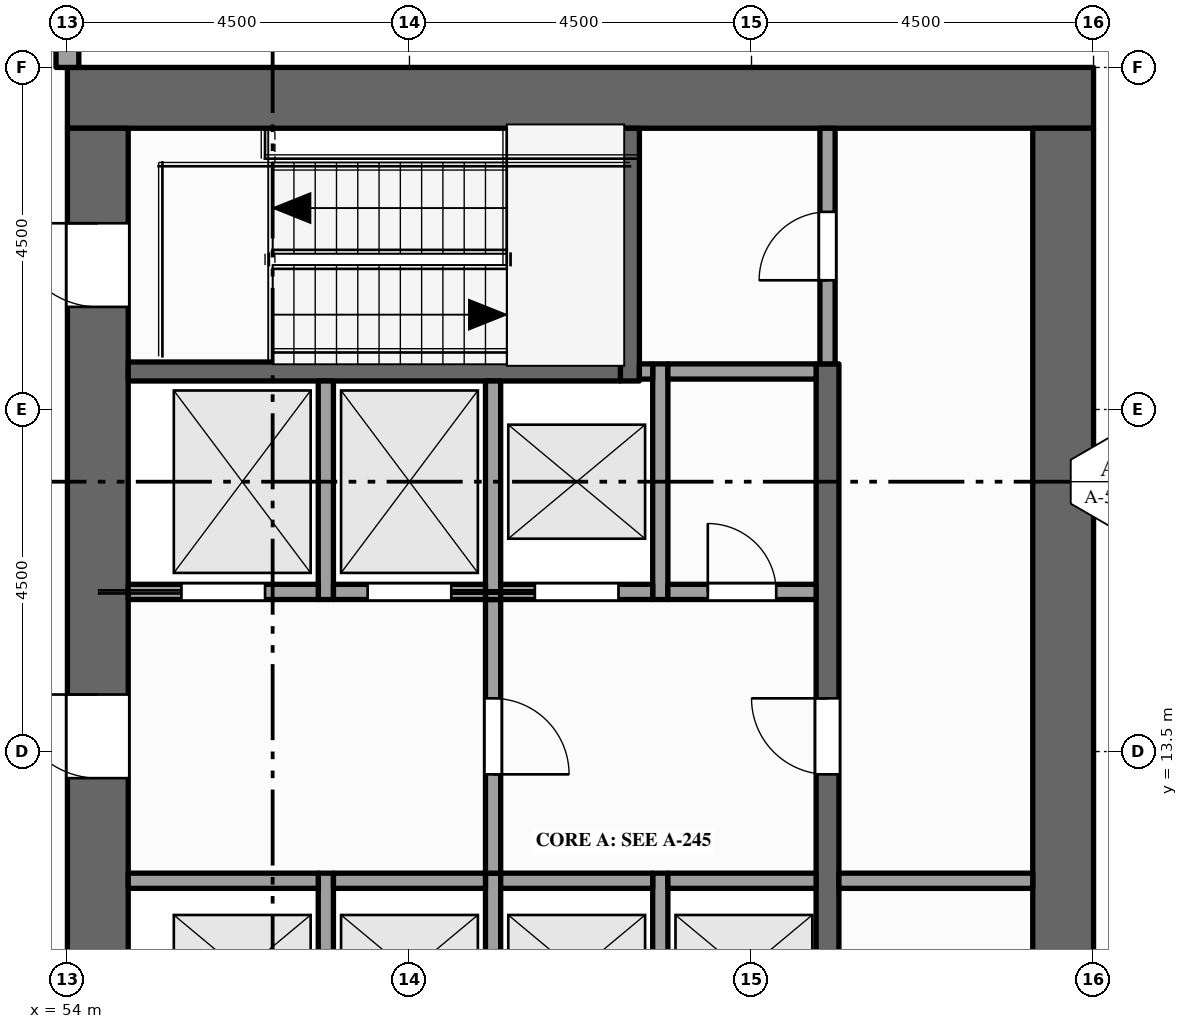
"""IFC4 building model, lengths in metres.
Left out: names, types, materials, properties, quantities, classifications, styles, units other than length and angle.
Written with IfcOpenShell. Run it as: python <this file> out.ifc"""

import sys

from ifc_helpers import new_model, si_unit, direction, frame, frame_2d, origin, place, context, subcontext, project, spatial, rectangle, extrude, element, fill, save


model = new_model("IFC4")
c1 = context("Model", 3, precision=1e-05, world=origin(), true_north=direction((0.0, 1.0)))
c2 = subcontext(c1, "Body", "Model", "MODEL_VIEW")
j1 = project(units=[si_unit("LENGTHUNIT", "METRE"), si_unit("PLANEANGLEUNIT", "RADIAN")], contexts=[c1])
p1 = place(None, origin())
s1 = spatial("IfcSite", under=j1, at=p1, CompositionType="ELEMENT")
p2 = place(p1, origin())
s2 = spatial("IfcBuilding", under=s1, at=p2, CompositionType="ELEMENT")
p3 = place(p2, frame((0.0, 0.0, 249.0)))
s3 = spatial("IfcBuildingStorey", under=s2, at=p3, CompositionType="ELEMENT", Elevation=249.0)
p4 = place(p3, frame((54.0, 22.1, -0.15), z_axis=(0.0, 0.0, 1.0), x_axis=(1.0, 0.0, 0.0)))
e1 = element("IfcWall", 1, at=p4, inside=s3, PredefinedType="SHEAR", context=c2, shape_type="SweptSolid", body=[
    extrude(rectangle(XDim=13.5, YDim=0.8, at=frame_2d((6.75, 0.0))), origin(), (0.0, 0.0, 1.0), 4.0),
])
p5 = place(p3, frame((54.4, 0.8, -0.15), z_axis=(0.0, 0.0, 1.0), x_axis=(0.0, 1.0, 0.0)))
e2 = element("IfcWall", 2, at=p5, inside=s3, PredefinedType="SHEAR", context=c2, shape_type="SweptSolid", body=[
    extrude(rectangle(XDim=20.9, YDim=0.8, at=frame_2d((10.45, 0.0))), origin(), (0.0, 0.0, 1.0), 4.0),
])
p6 = place(p5, frame((6.3, 0.0, 0.15)))
e3 = element("IfcOpeningElement", 3, at=p6, cuts=e2, PredefinedType="OPENING", context=c2, shape_type="SweptSolid", body=[
    extrude(rectangle(XDim=1.8, YDim=2.1, at=frame_2d((0.9, 1.05))), frame((0.0, 0.41, 0.0), z_axis=(0.0, -1.0, 0.0), x_axis=(1.0, 0.0, 0.0)), (0.0, 0.0, 1.0), 0.82),
])
p7 = place(p5, frame((12.35, 0.0, 0.15)))
e4 = element("IfcOpeningElement", 4, at=p7, cuts=e2, PredefinedType="OPENING", context=c2, shape_type="SweptSolid", body=[
    extrude(rectangle(XDim=1.1, YDim=2.1, at=frame_2d((0.55, 1.05))), frame((0.0, 0.41, 0.0), z_axis=(0.0, -1.0, 0.0), x_axis=(1.0, 0.0, 0.0)), (0.0, 0.0, 1.0), 0.82),
])
p8 = place(p5, frame((1.35, 0.0, 0.15)))
e5 = element("IfcOpeningElement", 5, at=p8, cuts=e2, PredefinedType="OPENING", context=c2, shape_type="SweptSolid", body=[
    extrude(rectangle(XDim=1.1, YDim=2.1, at=frame_2d((0.55, 1.05))), frame((0.0, 0.41, 0.0), z_axis=(0.0, -1.0, 0.0), x_axis=(1.0, 0.0, 0.0)), (0.0, 0.0, 1.0), 0.82),
])
p9 = place(p5, frame((18.55, 0.0, 0.15)))
e6 = element("IfcOpeningElement", 6, at=p9, cuts=e2, PredefinedType="OPENING", context=c2, shape_type="SweptSolid", body=[
    extrude(rectangle(XDim=1.1, YDim=2.1, at=frame_2d((0.55, 1.05))), frame((0.0, 0.41, 0.0), z_axis=(0.0, -1.0, 0.0), x_axis=(1.0, 0.0, 0.0)), (0.0, 0.0, 1.0), 0.82),
])
p10 = place(p3, frame((67.1, 0.8, -0.15), z_axis=(0.0, 0.0, 1.0), x_axis=(0.0, 1.0, 0.0)))
e7 = element("IfcWall", 7, at=p10, inside=s3, PredefinedType="SHEAR", context=c2, shape_type="SweptSolid", body=[
    extrude(rectangle(XDim=20.9, YDim=0.8, at=frame_2d((10.45, 0.0))), origin(), (0.0, 0.0, 1.0), 4.0),
])
p11 = place(p3, frame((54.0, 22.5, 0.0), z_axis=(0.0, 0.0, 1.0), x_axis=(0.0, 1.0, 0.0)))
e8 = element("IfcWall", 8, at=p11, inside=s3, PredefinedType="STANDARD", context=c2, shape_type="SweptSolid", body=[
    extrude(rectangle(XDim=1.175, YDim=0.3, at=frame_2d((0.587, 0.0))), origin(), (0.0, 0.0, 1.0), 3.162),
])
p12 = place(p3, frame((57.4, 9.3, 0.0), z_axis=(0.0, 0.0, 1.0), x_axis=(0.0, 1.0, 0.0)))
e9 = element("IfcWall", 9, at=p12, inside=s3, PredefinedType="SOLIDWALL", context=c2, shape_type="SweptSolid", body=[
    extrude(rectangle(XDim=2.6, YDim=0.2, at=frame_2d((1.3, 0.0))), origin(), (0.0, 0.0, 1.0), 3.85),
])
p13 = place(p3, frame((57.4, 15.5, 0.0), z_axis=(0.0, 0.0, 1.0), x_axis=(0.0, 1.0, 0.0)))
e10 = element("IfcWall", 10, at=p13, inside=s3, PredefinedType="SOLIDWALL", context=c2, shape_type="SweptSolid", body=[
    extrude(rectangle(XDim=2.875, YDim=0.2, at=frame_2d((1.438, 0.0))), origin(), (0.0, 0.0, 1.0), 3.85),
])
p14 = place(p3, frame((59.6, 9.3, 0.0), z_axis=(0.0, 0.0, 1.0), x_axis=(0.0, 1.0, 0.0)))
e11 = element("IfcWall", 11, at=p14, inside=s3, PredefinedType="SOLIDWALL", context=c2, shape_type="SweptSolid", body=[
    extrude(rectangle(XDim=2.6, YDim=0.2, at=frame_2d((1.3, 0.0))), origin(), (0.0, 0.0, 1.0), 3.85),
])
p15 = place(p3, frame((59.6, 11.9, 0.0), z_axis=(0.0, 0.0, 1.0), x_axis=(0.0, 1.0, 0.0)))
e12 = element("IfcWall", 12, at=p15, inside=s3, PredefinedType="PARTITIONING", context=c2, shape_type="SweptSolid", body=[
    extrude(rectangle(XDim=3.6, YDim=0.2, at=frame_2d((1.8, 0.0))), origin(), (0.0, 0.0, 1.0), 3.85),
])
p16 = place(p15, frame((1.3, 0.0, 0.0)))
e13 = element("IfcOpeningElement", 13, at=p16, cuts=e12, PredefinedType="OPENING", context=c2, shape_type="SweptSolid", body=[
    extrude(rectangle(XDim=1.0, YDim=2.1, at=frame_2d((0.5, 1.05))), frame((0.0, 0.11, 0.0), z_axis=(0.0, -1.0, 0.0), x_axis=(1.0, 0.0, 0.0)), (0.0, 0.0, 1.0), 0.22),
])
p17 = place(p3, frame((59.6, 15.5, 0.0), z_axis=(0.0, 0.0, 1.0), x_axis=(0.0, 1.0, 0.0)))
e14 = element("IfcWall", 14, at=p17, inside=s3, PredefinedType="SOLIDWALL", context=c2, shape_type="SweptSolid", body=[
    extrude(rectangle(XDim=2.875, YDim=0.2, at=frame_2d((1.438, 0.0))), origin(), (0.0, 0.0, 1.0), 3.85),
])
p18 = place(p3, frame((61.4, 18.375, 0.0), z_axis=(0.0, 0.0, 1.0), x_axis=(0.0, 1.0, 0.0)))
e15 = element("IfcWall", 15, at=p18, inside=s3, PredefinedType="SHEAR", context=c2, shape_type="SweptSolid", body=[
    extrude(rectangle(XDim=3.325, YDim=0.25, at=frame_2d((1.663, 0.0))), origin(), (0.0, 0.0, 1.0), 3.85),
])
p19 = place(p3, frame((61.8, 9.3, 0.0), z_axis=(0.0, 0.0, 1.0), x_axis=(0.0, 1.0, 0.0)))
e16 = element("IfcWall", 16, at=p19, inside=s3, PredefinedType="SOLIDWALL", context=c2, shape_type="SweptSolid", body=[
    extrude(rectangle(XDim=2.6, YDim=0.2, at=frame_2d((1.3, 0.0))), origin(), (0.0, 0.0, 1.0), 3.85),
])
p20 = place(p3, frame((61.8, 15.5, 0.0), z_axis=(0.0, 0.0, 1.0), x_axis=(0.0, 1.0, 0.0)))
e17 = element("IfcWall", 17, at=p20, inside=s3, PredefinedType="SOLIDWALL", context=c2, shape_type="SweptSolid", body=[
    extrude(rectangle(XDim=3.1, YDim=0.2, at=frame_2d((1.55, 0.0))), origin(), (0.0, 0.0, 1.0), 3.85),
])
p21 = place(p3, frame((64.0, 4.1, 0.0), z_axis=(0.0, 0.0, 1.0), x_axis=(0.0, 1.0, 0.0)))
e18 = element("IfcWall", 18, at=p21, inside=s3, PredefinedType="SHEAR", context=c2, shape_type="SweptSolid", body=[
    extrude(rectangle(XDim=14.5, YDim=0.3, at=frame_2d((7.25, 0.0))), origin(), (0.0, 0.0, 1.0), 3.85),
])
p22 = place(p21, frame((3.4, 0.0, 0.0)))
e19 = element("IfcOpeningElement", 19, at=p22, cuts=e18, PredefinedType="OPENING", context=c2, shape_type="SweptSolid", body=[
    extrude(rectangle(XDim=1.0, YDim=2.1, at=frame_2d((0.5, 1.05))), frame((0.0, 0.16, 0.0), z_axis=(0.0, -1.0, 0.0), x_axis=(1.0, 0.0, 0.0)), (0.0, 0.0, 1.0), 0.32),
])
p23 = place(p21, frame((9.1, 0.0, 0.0)))
e20 = element("IfcOpeningElement", 20, at=p23, cuts=e18, PredefinedType="OPENING", context=c2, shape_type="SweptSolid", body=[
    extrude(rectangle(XDim=1.0, YDim=2.1, at=frame_2d((0.5, 1.05))), frame((0.0, 0.16, 0.0), z_axis=(0.0, -1.0, 0.0), x_axis=(1.0, 0.0, 0.0)), (0.0, 0.0, 1.0), 0.32),
])
p24 = place(p3, frame((64.0, 18.6, 0.0), z_axis=(0.0, 0.0, 1.0), x_axis=(0.0, 1.0, 0.0)))
e21 = element("IfcWall", 21, at=p24, inside=s3, PredefinedType="PARTITIONING", context=c2, shape_type="SweptSolid", body=[
    extrude(rectangle(XDim=3.1, YDim=0.2, at=frame_2d((1.55, 0.0))), origin(), (0.0, 0.0, 1.0), 3.85),
])
p25 = place(p24, frame((1.1, 0.0, 0.0)))
e22 = element("IfcOpeningElement", 22, at=p25, cuts=e21, PredefinedType="OPENING", context=c2, shape_type="SweptSolid", body=[
    extrude(rectangle(XDim=0.9, YDim=2.1, at=frame_2d((0.45, 1.05))), frame((0.0, 0.11, 0.0), z_axis=(0.0, -1.0, 0.0), x_axis=(1.0, 0.0, 0.0)), (0.0, 0.0, 1.0), 0.22),
])
p26 = place(p3, frame((54.8, 11.8, 0.0), z_axis=(0.0, 0.0, 1.0), x_axis=(1.0, 0.0, 0.0)))
e23 = element("IfcWall", 23, at=p26, inside=s3, PredefinedType="SOLIDWALL", context=c2, shape_type="SweptSolid", body=[
    extrude(rectangle(XDim=2.5, YDim=0.2, at=frame_2d((1.25, 0.0))), origin(), (0.0, 0.0, 1.0), 3.85),
])
for number, where, z_axis, x_axis in (
    (24, (57.5, 11.8, 0.0), (0.0, 0.0, 1.0), (1.0, 0.0, 0.0)),
    (25, (59.7, 11.8, 0.0), (0.0, 0.0, 1.0), (1.0, 0.0, 0.0)),
):
    element("IfcWall", number, at=place(p3, frame(where, z_axis=z_axis, x_axis=x_axis)), inside=s3, PredefinedType="SOLIDWALL", context=c2, shape_type="SweptSolid", body=[
        extrude(rectangle(XDim=2.0, YDim=0.2, at=frame_2d((1.0, 0.0))), origin(), (0.0, 0.0, 1.0), 3.85),
    ])
p27 = place(p3, frame((61.9, 11.8, 0.0), z_axis=(0.0, 0.0, 1.0), x_axis=(1.0, 0.0, 0.0)))
e26 = element("IfcWall", 26, at=p27, inside=s3, PredefinedType="SOLIDWALL", context=c2, shape_type="SweptSolid", body=[
    extrude(rectangle(XDim=1.95, YDim=0.2, at=frame_2d((0.975, 0.0))), origin(), (0.0, 0.0, 1.0), 3.85),
])
p28 = place(p3, frame((64.15, 11.8, 0.0), z_axis=(0.0, 0.0, 1.0), x_axis=(1.0, 0.0, 0.0)))
e27 = element("IfcWall", 27, at=p28, inside=s3, PredefinedType="PARTITIONING", context=c2, shape_type="SweptSolid", body=[
    extrude(rectangle(XDim=2.55, YDim=0.2, at=frame_2d((1.275, 0.0))), origin(), (0.0, 0.0, 1.0), 3.85),
])
p29 = place(p3, frame((54.8, 15.6, 0.0), z_axis=(0.0, 0.0, 1.0), x_axis=(1.0, 0.0, 0.0)))
e28 = element("IfcWall", 28, at=p29, inside=s3, PredefinedType="SOLIDWALL", context=c2, shape_type="SweptSolid", body=[
    extrude(rectangle(XDim=2.5, YDim=0.2, at=frame_2d((1.25, 0.0))), origin(), (0.0, 0.0, 1.0), 3.85),
])
p30 = place(p29, frame((0.7, 0.0, 0.012)))
e29 = element("IfcOpeningElement", 29, at=p30, cuts=e28, PredefinedType="OPENING", context=c2, shape_type="SweptSolid", body=[
    extrude(rectangle(XDim=1.1, YDim=2.1, at=frame_2d((0.55, 1.05))), frame((0.0, 0.11, 0.0), z_axis=(0.0, -1.0, 0.0), x_axis=(1.0, 0.0, 0.0)), (0.0, 0.0, 1.0), 0.22),
])
p31 = place(p3, frame((57.5, 15.6, 0.0), z_axis=(0.0, 0.0, 1.0), x_axis=(1.0, 0.0, 0.0)))
e30 = element("IfcWall", 30, at=p31, inside=s3, PredefinedType="SOLIDWALL", context=c2, shape_type="SweptSolid", body=[
    extrude(rectangle(XDim=2.0, YDim=0.2, at=frame_2d((1.0, 0.0))), origin(), (0.0, 0.0, 1.0), 3.85),
])
p32 = place(p31, frame((0.45, 0.0, 0.012)))
e31 = element("IfcOpeningElement", 31, at=p32, cuts=e30, PredefinedType="OPENING", context=c2, shape_type="SweptSolid", body=[
    extrude(rectangle(XDim=1.1, YDim=2.1, at=frame_2d((0.55, 1.05))), frame((0.0, 0.11, 0.0), z_axis=(0.0, -1.0, 0.0), x_axis=(1.0, 0.0, 0.0)), (0.0, 0.0, 1.0), 0.22),
])
p33 = place(p3, frame((59.7, 15.6, 0.0), z_axis=(0.0, 0.0, 1.0), x_axis=(1.0, 0.0, 0.0)))
e32 = element("IfcWall", 32, at=p33, inside=s3, PredefinedType="SOLIDWALL", context=c2, shape_type="SweptSolid", body=[
    extrude(rectangle(XDim=2.0, YDim=0.2, at=frame_2d((1.0, 0.0))), origin(), (0.0, 0.0, 1.0), 3.85),
])
p34 = place(p33, frame((0.45, 0.0, 0.012)))
e33 = element("IfcOpeningElement", 33, at=p34, cuts=e32, PredefinedType="OPENING", context=c2, shape_type="SweptSolid", body=[
    extrude(rectangle(XDim=1.1, YDim=2.1, at=frame_2d((0.55, 1.05))), frame((0.0, 0.11, 0.0), z_axis=(0.0, -1.0, 0.0), x_axis=(1.0, 0.0, 0.0)), (0.0, 0.0, 1.0), 0.22),
])
p35 = place(p3, frame((61.9, 15.6, 0.0), z_axis=(0.0, 0.0, 1.0), x_axis=(1.0, 0.0, 0.0)))
e34 = element("IfcWall", 34, at=p35, inside=s3, PredefinedType="PARTITIONING", context=c2, shape_type="SweptSolid", body=[
    extrude(rectangle(XDim=1.95, YDim=0.2, at=frame_2d((0.975, 0.0))), origin(), (0.0, 0.0, 1.0), 3.85),
])
p36 = place(p35, frame((0.525, 0.0, 0.0)))
e35 = element("IfcOpeningElement", 35, at=p36, cuts=e34, PredefinedType="OPENING", context=c2, shape_type="SweptSolid", body=[
    extrude(rectangle(XDim=0.9, YDim=2.1, at=frame_2d((0.45, 1.05))), frame((0.0, 0.11, 0.0), z_axis=(0.0, -1.0, 0.0), x_axis=(1.0, 0.0, 0.0)), (0.0, 0.0, 1.0), 0.22),
])
p37 = place(p3, frame((54.8, 18.5, 0.0), z_axis=(0.0, 0.0, 1.0), x_axis=(1.0, 0.0, 0.0)))
e36 = element("IfcWall", 36, at=p37, inside=s3, PredefinedType="SHEAR", context=c2, shape_type="SweptSolid", body=[
    extrude(rectangle(XDim=6.475, YDim=0.25, at=frame_2d((3.237, 0.0))), origin(), (0.0, 0.0, 1.0), 3.85),
])
p38 = place(p3, frame((61.525, 18.5, 0.0), z_axis=(0.0, 0.0, 1.0), x_axis=(1.0, 0.0, 0.0)))
e37 = element("IfcWall", 37, at=p38, inside=s3, PredefinedType="SOLIDWALL", context=c2, shape_type="SweptSolid", body=[
    extrude(rectangle(XDim=0.175, YDim=0.2, at=frame_2d((0.087, 0.0))), origin(), (0.0, 0.0, 1.0), 3.85),
])
p39 = place(p3, frame((61.9, 18.5, 0.0), z_axis=(0.0, 0.0, 1.0), x_axis=(1.0, 0.0, 0.0)))
e38 = element("IfcWall", 38, at=p39, inside=s3, PredefinedType="PARTITIONING", context=c2, shape_type="SweptSolid", body=[
    extrude(rectangle(XDim=1.95, YDim=0.2, at=frame_2d((0.975, 0.0))), origin(), (0.0, 0.0, 1.0), 3.85),
])
p40 = place(p30, origin())
e39 = element("IfcDoor", 39, at=p40, inside=s3, OperationType="SLIDING_TO_LEFT", PredefinedType="DOOR", context=c2, shape_type="SweptSolid", body=[
    extrude(rectangle(XDim=1.1, YDim=2.1, at=frame_2d((0.55, 1.05))), frame((0.0, 0.025, 0.0), z_axis=(0.0, -1.0, 0.0), x_axis=(1.0, 0.0, 0.0)), (0.0, 0.0, 1.0), 0.05),
])
fill(e29, e39)
p41 = place(p32, origin())
e40 = element("IfcDoor", 40, at=p41, inside=s3, OperationType="SLIDING_TO_RIGHT", PredefinedType="DOOR", context=c2, shape_type="SweptSolid", body=[
    extrude(rectangle(XDim=1.1, YDim=2.1, at=frame_2d((0.55, 1.05))), frame((0.0, 0.025, 0.0), z_axis=(0.0, -1.0, 0.0), x_axis=(1.0, 0.0, 0.0)), (0.0, 0.0, 1.0), 0.05),
])
fill(e31, e40)
p42 = place(p34, origin())
e41 = element("IfcDoor", 41, at=p42, inside=s3, OperationType="SLIDING_TO_LEFT", PredefinedType="DOOR", context=c2, shape_type="SweptSolid", body=[
    extrude(rectangle(XDim=1.1, YDim=2.1, at=frame_2d((0.55, 1.05))), frame((0.0, 0.025, 0.0), z_axis=(0.0, -1.0, 0.0), x_axis=(1.0, 0.0, 0.0)), (0.0, 0.0, 1.0), 0.05),
])
fill(e33, e41)
p43 = place(p7, origin())
e42 = element("IfcDoor", 42, at=p43, inside=s3, OperationType="SINGLE_SWING_RIGHT", PredefinedType="DOOR", context=c2, shape_type="SweptSolid", body=[
    extrude(rectangle(XDim=1.1, YDim=2.1, at=frame_2d((0.55, 1.05))), frame((0.0, 0.025, 0.0), z_axis=(0.0, -1.0, 0.0), x_axis=(1.0, 0.0, 0.0)), (0.0, 0.0, 1.0), 0.05),
])
fill(e4, e42)
p44 = place(p16, origin())
e43 = element("IfcDoor", 43, at=p44, inside=s3, OperationType="SINGLE_SWING_LEFT", PredefinedType="DOOR", context=c2, shape_type="SweptSolid", body=[
    extrude(rectangle(XDim=1.0, YDim=2.1, at=frame_2d((0.5, 1.05))), frame((0.0, 0.025, 0.0), z_axis=(0.0, -1.0, 0.0), x_axis=(1.0, 0.0, 0.0)), (0.0, 0.0, 1.0), 0.05),
])
fill(e13, e43)
p45 = place(p23, origin())
e44 = element("IfcDoor", 44, at=p45, inside=s3, OperationType="SINGLE_SWING_RIGHT", PredefinedType="DOOR", context=c2, shape_type="SweptSolid", body=[
    extrude(rectangle(XDim=1.0, YDim=2.1, at=frame_2d((0.5, 1.05))), frame((0.0, 0.025, 0.0), z_axis=(0.0, -1.0, 0.0), x_axis=(1.0, 0.0, 0.0)), (0.0, 0.0, 1.0), 0.05),
])
fill(e20, e44)
p46 = place(p9, origin())
e45 = element("IfcDoor", 45, at=p46, inside=s3, OperationType="SINGLE_SWING_RIGHT", PredefinedType="DOOR", context=c2, shape_type="SweptSolid", body=[
    extrude(rectangle(XDim=1.1, YDim=2.1, at=frame_2d((0.55, 1.05))), frame((0.0, 0.025, 0.0), z_axis=(0.0, -1.0, 0.0), x_axis=(1.0, 0.0, 0.0)), (0.0, 0.0, 1.0), 0.05),
])
fill(e6, e45)
p47 = place(p25, origin())
e46 = element("IfcDoor", 46, at=p47, inside=s3, OperationType="SINGLE_SWING_LEFT", PredefinedType="DOOR", context=c2, shape_type="SweptSolid", body=[
    extrude(rectangle(XDim=0.9, YDim=2.1, at=frame_2d((0.45, 1.05))), frame((0.0, 0.025, 0.0), z_axis=(0.0, -1.0, 0.0), x_axis=(1.0, 0.0, 0.0)), (0.0, 0.0, 1.0), 0.05),
])
fill(e22, e46)
p48 = place(p36, origin())
e47 = element("IfcDoor", 47, at=p48, inside=s3, OperationType="SINGLE_SWING_LEFT", PredefinedType="DOOR", context=c2, shape_type="SweptSolid", body=[
    extrude(rectangle(XDim=0.9, YDim=2.1, at=frame_2d((0.45, 1.05))), frame((0.0, 0.025, 0.0), z_axis=(0.0, -1.0, 0.0), x_axis=(1.0, 0.0, 0.0)), (0.0, 0.0, 1.0), 0.05),
])
fill(e35, e47)
save(model, sys.argv[1])
